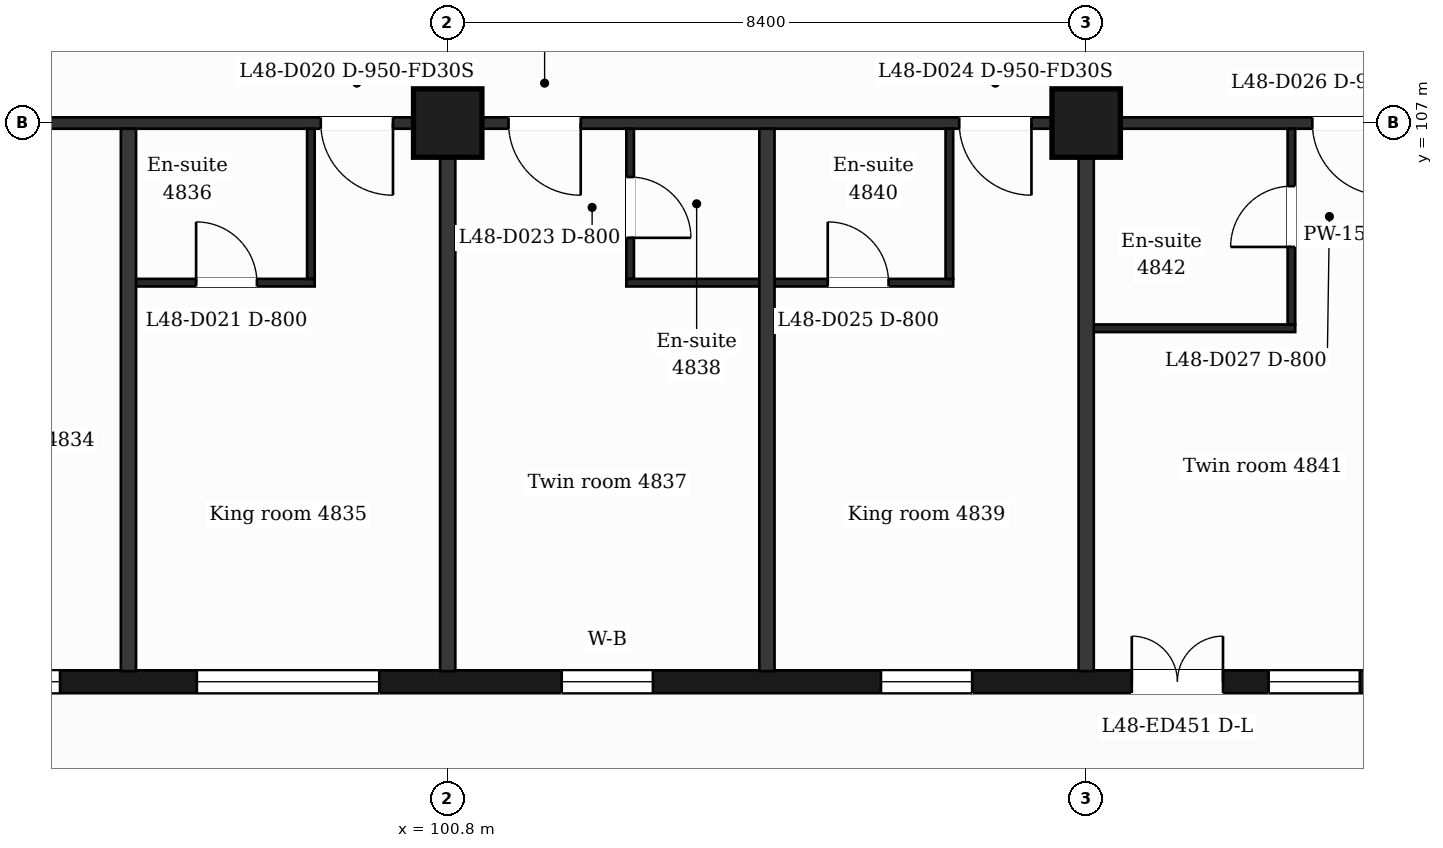
"""IFC4 building model, lengths in metres.
Left out: names, types, materials, properties, quantities, classifications, styles, units other than length and angle.
Written with IfcOpenShell. Run it as: python <this file> out.ifc"""

import sys

from ifc_helpers import new_model, si_unit, direction, frame, frame_2d, origin, origin_2d, place, context, subcontext, project, spatial, rectangle, extrude, element, fill, save


model = new_model("IFC4")
c1 = context("Model", 3, precision=1e-05, world=origin(), true_north=direction((0.0, 1.0)))
c2 = subcontext(c1, "Body", "Model", "MODEL_VIEW")
j1 = project(units=[si_unit("LENGTHUNIT", "METRE"), si_unit("PLANEANGLEUNIT", "RADIAN")], contexts=[c1])
p1 = place(None, origin())
s1 = spatial("IfcSite", under=j1, at=p1, CompositionType="ELEMENT")
p2 = place(p1, origin())
s2 = spatial("IfcBuilding", under=s1, at=p2, CompositionType="ELEMENT")
p3 = place(p2, frame((0.0, 0.0, 202.2)))
s3 = spatial("IfcBuildingStorey", under=s2, at=p3, CompositionType="ELEMENT", Elevation=202.2)
for number, where, z_axis, x_axis in (
    (1, (100.8, 107.0, 0.0), (0.0, 0.0, 1.0), (1.0, 0.0, 0.0)),
    (2, (109.2, 107.0, 0.0), (0.0, 0.0, 1.0), (1.0, 0.0, 0.0)),
):
    element("IfcColumn", number, at=place(p3, frame(where, z_axis=z_axis, x_axis=x_axis)), inside=s3, PredefinedType="COLUMN", context=c2, shape_type="SweptSolid", body=[
        extrude(rectangle(XDim=0.9, YDim=0.9, at=origin_2d()), origin(), (0.0, 0.0, 1.0), 3.7),
    ])
p4 = place(p3, frame((89.85, 99.65, 0.0), z_axis=(0.0, 0.0, 1.0), x_axis=(1.0, 0.0, 0.0)))
e3 = element("IfcWall", 3, at=p4, inside=s3, PredefinedType="SOLIDWALL", context=c2, shape_type="SweptSolid", body=[
    extrude(rectangle(XDim=47.25, YDim=0.3, at=frame_2d((23.625, 0.0))), origin(), (0.0, 0.0, 1.0), 3.38),
])
p5 = place(p4, frame((0.725, 0.0, 0.9)))
e4 = element("IfcOpeningElement", 4, at=p5, cuts=e3, PredefinedType="OPENING", context=c2, shape_type="SweptSolid", body=[
    extrude(rectangle(XDim=1.2, YDim=2.1, at=frame_2d((0.6, 1.05))), frame((0.0, 0.16, 0.0), z_axis=(0.0, -1.0, 0.0), x_axis=(1.0, 0.0, 0.0)), (0.0, 0.0, 1.0), 0.32),
])
p6 = place(p4, frame((3.45, 0.0, 0.9)))
e5 = element("IfcOpeningElement", 5, at=p6, cuts=e3, PredefinedType="OPENING", context=c2, shape_type="SweptSolid", body=[
    extrude(rectangle(XDim=2.4, YDim=2.1, at=frame_2d((1.2, 1.05))), frame((0.0, 0.16, 0.0), z_axis=(0.0, -1.0, 0.0), x_axis=(1.0, 0.0, 0.0)), (0.0, 0.0, 1.0), 0.32),
])
p7 = place(p4, frame((7.65, 0.0, 0.9)))
e6 = element("IfcOpeningElement", 6, at=p7, cuts=e3, PredefinedType="OPENING", context=c2, shape_type="SweptSolid", body=[
    extrude(rectangle(XDim=2.4, YDim=2.1, at=frame_2d((1.2, 1.05))), frame((0.0, 0.16, 0.0), z_axis=(0.0, -1.0, 0.0), x_axis=(1.0, 0.0, 0.0)), (0.0, 0.0, 1.0), 0.32),
])
p8 = place(p4, frame((12.45, 0.0, 0.9)))
e7 = element("IfcOpeningElement", 7, at=p8, cuts=e3, PredefinedType="OPENING", context=c2, shape_type="SweptSolid", body=[
    extrude(rectangle(XDim=1.2, YDim=2.1, at=frame_2d((0.6, 1.05))), frame((0.0, 0.16, 0.0), z_axis=(0.0, -1.0, 0.0), x_axis=(1.0, 0.0, 0.0)), (0.0, 0.0, 1.0), 0.32),
])
p9 = place(p4, frame((16.65, 0.0, 0.9)))
e8 = element("IfcOpeningElement", 8, at=p9, cuts=e3, PredefinedType="OPENING", context=c2, shape_type="SweptSolid", body=[
    extrude(rectangle(XDim=1.2, YDim=2.1, at=frame_2d((0.6, 1.05))), frame((0.0, 0.16, 0.0), z_axis=(0.0, -1.0, 0.0), x_axis=(1.0, 0.0, 0.0)), (0.0, 0.0, 1.0), 0.32),
])
p10 = place(p4, frame((19.95, 0.0, 0.0)))
e9 = element("IfcOpeningElement", 9, at=p10, cuts=e3, PredefinedType="OPENING", context=c2, shape_type="SweptSolid", body=[
    extrude(rectangle(XDim=1.2, YDim=2.4, at=frame_2d((0.6, 1.2))), frame((0.0, 0.16, 0.0), z_axis=(0.0, -1.0, 0.0), x_axis=(1.0, 0.0, 0.0)), (0.0, 0.0, 1.0), 0.32),
])
p11 = place(p4, frame((21.75, 0.0, 0.9)))
e10 = element("IfcOpeningElement", 10, at=p11, cuts=e3, PredefinedType="OPENING", context=c2, shape_type="SweptSolid", body=[
    extrude(rectangle(XDim=1.2, YDim=2.1, at=frame_2d((0.6, 1.05))), frame((0.0, 0.16, 0.0), z_axis=(0.0, -1.0, 0.0), x_axis=(1.0, 0.0, 0.0)), (0.0, 0.0, 1.0), 0.32),
])
p12 = place(p4, frame((24.45, 0.0, 0.9)))
e11 = element("IfcOpeningElement", 11, at=p12, cuts=e3, PredefinedType="OPENING", context=c2, shape_type="SweptSolid", body=[
    extrude(rectangle(XDim=2.4, YDim=2.1, at=frame_2d((1.2, 1.05))), frame((0.0, 0.16, 0.0), z_axis=(0.0, -1.0, 0.0), x_axis=(1.0, 0.0, 0.0)), (0.0, 0.0, 1.0), 0.32),
])
p13 = place(p4, frame((28.35, 0.0, 0.0)))
e12 = element("IfcOpeningElement", 12, at=p13, cuts=e3, PredefinedType="OPENING", context=c2, shape_type="SweptSolid", body=[
    extrude(rectangle(XDim=1.2, YDim=2.4, at=frame_2d((0.6, 1.2))), frame((0.0, 0.16, 0.0), z_axis=(0.0, -1.0, 0.0), x_axis=(1.0, 0.0, 0.0)), (0.0, 0.0, 1.0), 0.32),
])
p14 = place(p4, frame((30.15, 0.0, 0.9)))
e13 = element("IfcOpeningElement", 13, at=p14, cuts=e3, PredefinedType="OPENING", context=c2, shape_type="SweptSolid", body=[
    extrude(rectangle(XDim=1.2, YDim=2.1, at=frame_2d((0.6, 1.05))), frame((0.0, 0.16, 0.0), z_axis=(0.0, -1.0, 0.0), x_axis=(1.0, 0.0, 0.0)), (0.0, 0.0, 1.0), 0.32),
])
p15 = place(p4, frame((32.85, 0.0, 0.9)))
e14 = element("IfcOpeningElement", 14, at=p15, cuts=e3, PredefinedType="OPENING", context=c2, shape_type="SweptSolid", body=[
    extrude(rectangle(XDim=2.4, YDim=2.1, at=frame_2d((1.2, 1.05))), frame((0.0, 0.16, 0.0), z_axis=(0.0, -1.0, 0.0), x_axis=(1.0, 0.0, 0.0)), (0.0, 0.0, 1.0), 0.32),
])
p16 = place(p4, frame((37.05, 0.0, 0.9)))
e15 = element("IfcOpeningElement", 15, at=p16, cuts=e3, PredefinedType="OPENING", context=c2, shape_type="SweptSolid", body=[
    extrude(rectangle(XDim=2.4, YDim=2.1, at=frame_2d((1.2, 1.05))), frame((0.0, 0.16, 0.0), z_axis=(0.0, -1.0, 0.0), x_axis=(1.0, 0.0, 0.0)), (0.0, 0.0, 1.0), 0.32),
])
p17 = place(p4, frame((41.85, 0.0, 0.9)))
e16 = element("IfcOpeningElement", 16, at=p17, cuts=e3, PredefinedType="OPENING", context=c2, shape_type="SweptSolid", body=[
    extrude(rectangle(XDim=1.2, YDim=2.1, at=frame_2d((0.6, 1.05))), frame((0.0, 0.16, 0.0), z_axis=(0.0, -1.0, 0.0), x_axis=(1.0, 0.0, 0.0)), (0.0, 0.0, 1.0), 0.32),
])
p18 = place(p4, frame((45.25, 0.0, 0.9)))
e17 = element("IfcOpeningElement", 17, at=p18, cuts=e3, PredefinedType="OPENING", context=c2, shape_type="SweptSolid", body=[
    extrude(rectangle(XDim=1.2, YDim=2.1, at=frame_2d((0.6, 1.05))), frame((0.0, 0.16, 0.0), z_axis=(0.0, -1.0, 0.0), x_axis=(1.0, 0.0, 0.0)), (0.0, 0.0, 1.0), 0.32),
])
p19 = place(p3, frame((109.2, 104.3, 0.0), z_axis=(0.0, 0.0, 1.0), x_axis=(1.0, 0.0, 0.0)))
e18 = element("IfcWall", 18, at=p19, inside=s3, PredefinedType="PARTITIONING", context=c2, shape_type="SweptSolid", body=[
    extrude(rectangle(XDim=2.75, YDim=0.1, at=frame_2d((1.375, 0.0))), origin(), (0.0, 0.0, 1.0), 3.38),
])
p20 = place(p3, frame((96.6, 104.9, 0.0), z_axis=(0.0, 0.0, 1.0), x_axis=(1.0, 0.0, 0.0)))
e19 = element("IfcWall", 19, at=p20, inside=s3, PredefinedType="PARTITIONING", context=c2, shape_type="SweptSolid", body=[
    extrude(rectangle(XDim=2.45, YDim=0.1, at=frame_2d((1.225, 0.0))), origin(), (0.0, 0.0, 1.0), 3.38),
])
p21 = place(p20, frame((0.89, 0.0, 0.0)))
e20 = element("IfcOpeningElement", 20, at=p21, cuts=e19, PredefinedType="OPENING", context=c2, shape_type="SweptSolid", body=[
    extrude(rectangle(XDim=0.8, YDim=2.1, at=frame_2d((0.4, 1.05))), frame((0.0, 0.06, 0.0), z_axis=(0.0, -1.0, 0.0), x_axis=(1.0, 0.0, 0.0)), (0.0, 0.0, 1.0), 0.12),
])
p22 = place(p3, frame((103.15, 104.9, 0.0), z_axis=(0.0, 0.0, 1.0), x_axis=(1.0, 0.0, 0.0)))
e21 = element("IfcWall", 21, at=p22, inside=s3, PredefinedType="PARTITIONING", context=c2, shape_type="SweptSolid", body=[
    extrude(rectangle(XDim=4.3, YDim=0.1, at=frame_2d((2.15, 0.0))), origin(), (0.0, 0.0, 1.0), 3.38),
])
p23 = place(p22, frame((2.65, 0.0, 0.0)))
e22 = element("IfcOpeningElement", 22, at=p23, cuts=e21, PredefinedType="OPENING", context=c2, shape_type="SweptSolid", body=[
    extrude(rectangle(XDim=0.8, YDim=2.1, at=frame_2d((0.4, 1.05))), frame((0.0, 0.06, 0.0), z_axis=(0.0, -1.0, 0.0), x_axis=(1.0, 0.0, 0.0)), (0.0, 0.0, 1.0), 0.12),
])
p24 = place(p3, frame((87.018, 107.0, 0.0), z_axis=(0.0, 0.0, 1.0), x_axis=(1.0, 0.0, 0.0)))
e23 = element("IfcWall", 23, at=p24, inside=s3, PredefinedType="PARTITIONING", context=c2, shape_type="SweptSolid", body=[
    extrude(rectangle(XDim=52.765, YDim=0.15, at=frame_2d((26.382, 0.0))), origin(), (0.0, 0.0, 1.0), 3.38),
])
p25 = place(p24, frame((1.276, 0.0, 0.0)))
e24 = element("IfcOpeningElement", 24, at=p25, cuts=e23, PredefinedType="OPENING", context=c2, shape_type="SweptSolid", body=[
    extrude(rectangle(XDim=0.95, YDim=2.1, at=frame_2d((0.475, 1.05))), frame((0.0, 0.085, 0.0), z_axis=(0.0, -1.0, 0.0), x_axis=(1.0, 0.0, 0.0)), (0.0, 0.0, 1.0), 0.17),
])
p26 = place(p24, frame((6.369, 0.0, 0.0)))
e25 = element("IfcOpeningElement", 25, at=p26, cuts=e23, PredefinedType="OPENING", context=c2, shape_type="SweptSolid", body=[
    extrude(rectangle(XDim=0.95, YDim=2.1, at=frame_2d((0.475, 1.05))), frame((0.0, 0.085, 0.0), z_axis=(0.0, -1.0, 0.0), x_axis=(1.0, 0.0, 0.0)), (0.0, 0.0, 1.0), 0.17),
])
p27 = place(p24, frame((12.112, 0.0, 0.0)))
e26 = element("IfcOpeningElement", 26, at=p27, cuts=e23, PredefinedType="OPENING", context=c2, shape_type="SweptSolid", body=[
    extrude(rectangle(XDim=0.95, YDim=2.1, at=frame_2d((0.475, 1.05))), frame((0.0, 0.085, 0.0), z_axis=(0.0, -1.0, 0.0), x_axis=(1.0, 0.0, 0.0)), (0.0, 0.0, 1.0), 0.17),
])
p28 = place(p24, frame((14.582, 0.0, 0.0)))
e27 = element("IfcOpeningElement", 27, at=p28, cuts=e23, PredefinedType="OPENING", context=c2, shape_type="SweptSolid", body=[
    extrude(rectangle(XDim=0.95, YDim=2.1, at=frame_2d((0.475, 1.05))), frame((0.0, 0.085, 0.0), z_axis=(0.0, -1.0, 0.0), x_axis=(1.0, 0.0, 0.0)), (0.0, 0.0, 1.0), 0.17),
])
p29 = place(p24, frame((20.512, 0.0, 0.0)))
e28 = element("IfcOpeningElement", 28, at=p29, cuts=e23, PredefinedType="OPENING", context=c2, shape_type="SweptSolid", body=[
    extrude(rectangle(XDim=0.95, YDim=2.1, at=frame_2d((0.475, 1.05))), frame((0.0, 0.085, 0.0), z_axis=(0.0, -1.0, 0.0), x_axis=(1.0, 0.0, 0.0)), (0.0, 0.0, 1.0), 0.17),
])
p30 = place(p24, frame((25.157, 0.0, 0.0)))
e29 = element("IfcOpeningElement", 29, at=p30, cuts=e23, PredefinedType="OPENING", context=c2, shape_type="SweptSolid", body=[
    extrude(rectangle(XDim=0.95, YDim=2.1, at=frame_2d((0.475, 1.05))), frame((0.0, 0.085, 0.0), z_axis=(0.0, -1.0, 0.0), x_axis=(1.0, 0.0, 0.0)), (0.0, 0.0, 1.0), 0.17),
])
p31 = place(p24, frame((26.657, 0.0, 0.0)))
e30 = element("IfcOpeningElement", 30, at=p31, cuts=e23, PredefinedType="OPENING", context=c2, shape_type="SweptSolid", body=[
    extrude(rectangle(XDim=0.95, YDim=2.1, at=frame_2d((0.475, 1.05))), frame((0.0, 0.085, 0.0), z_axis=(0.0, -1.0, 0.0), x_axis=(1.0, 0.0, 0.0)), (0.0, 0.0, 1.0), 0.17),
])
p32 = place(p24, frame((31.302, 0.0, 0.0)))
e31 = element("IfcOpeningElement", 31, at=p32, cuts=e23, PredefinedType="OPENING", context=c2, shape_type="SweptSolid", body=[
    extrude(rectangle(XDim=0.95, YDim=2.1, at=frame_2d((0.475, 1.05))), frame((0.0, 0.085, 0.0), z_axis=(0.0, -1.0, 0.0), x_axis=(1.0, 0.0, 0.0)), (0.0, 0.0, 1.0), 0.17),
])
p33 = place(p24, frame((41.207, 0.0, 0.0)))
e32 = element("IfcOpeningElement", 32, at=p33, cuts=e23, PredefinedType="OPENING", context=c2, shape_type="SweptSolid", body=[
    extrude(rectangle(XDim=1.0, YDim=2.1, at=frame_2d((0.5, 1.05))), frame((0.0, 0.085, 0.0), z_axis=(0.0, -1.0, 0.0), x_axis=(1.0, 0.0, 0.0)), (0.0, 0.0, 1.0), 0.17),
])
p34 = place(p24, frame((43.907, 0.0, 0.0)))
e33 = element("IfcOpeningElement", 33, at=p34, cuts=e23, PredefinedType="OPENING", context=c2, shape_type="SweptSolid", body=[
    extrude(rectangle(XDim=0.95, YDim=2.1, at=frame_2d((0.475, 1.05))), frame((0.0, 0.085, 0.0), z_axis=(0.0, -1.0, 0.0), x_axis=(1.0, 0.0, 0.0)), (0.0, 0.0, 1.0), 0.17),
])
p35 = place(p24, frame((49.285, 0.0, 0.0)))
e34 = element("IfcOpeningElement", 34, at=p35, cuts=e23, PredefinedType="OPENING", context=c2, shape_type="SweptSolid", body=[
    extrude(rectangle(XDim=0.95, YDim=2.1, at=frame_2d((0.475, 1.05))), frame((0.0, 0.085, 0.0), z_axis=(0.0, -1.0, 0.0), x_axis=(1.0, 0.0, 0.0)), (0.0, 0.0, 1.0), 0.17),
])
p36 = place(p3, frame((96.6, 99.79, 0.0), z_axis=(0.0, 0.0, 1.0), x_axis=(0.0, 1.0, 0.0)))
e35 = element("IfcWall", 35, at=p36, inside=s3, PredefinedType="PARTITIONING", context=c2, shape_type="SweptSolid", body=[
    extrude(rectangle(XDim=7.135, YDim=0.2, at=frame_2d((3.567, 0.0))), origin(), (0.0, 0.0, 1.0), 3.38),
])
p37 = place(p3, frame((99.0, 104.95, 0.0), z_axis=(0.0, 0.0, 1.0), x_axis=(0.0, 1.0, 0.0)))
e36 = element("IfcWall", 36, at=p37, inside=s3, PredefinedType="PARTITIONING", context=c2, shape_type="SweptSolid", body=[
    extrude(rectangle(XDim=1.975, YDim=0.1, at=frame_2d((0.988, 0.0))), origin(), (0.0, 0.0, 1.0), 3.38),
])
p38 = place(p3, frame((100.8, 99.79, 0.0), z_axis=(0.0, 0.0, 1.0), x_axis=(0.0, 1.0, 0.0)))
e37 = element("IfcWall", 37, at=p38, inside=s3, PredefinedType="PARTITIONING", context=c2, shape_type="SweptSolid", body=[
    extrude(rectangle(XDim=7.135, YDim=0.2, at=frame_2d((3.567, 0.0))), origin(), (0.0, 0.0, 1.0), 3.38),
])
p39 = place(p3, frame((103.2, 104.95, 0.0), z_axis=(0.0, 0.0, 1.0), x_axis=(0.0, 1.0, 0.0)))
e38 = element("IfcWall", 38, at=p39, inside=s3, PredefinedType="PARTITIONING", context=c2, shape_type="SweptSolid", body=[
    extrude(rectangle(XDim=1.975, YDim=0.1, at=frame_2d((0.988, 0.0))), origin(), (0.0, 0.0, 1.0), 3.38),
])
p40 = place(p39, frame((0.54, 0.0, 0.0)))
e39 = element("IfcOpeningElement", 39, at=p40, cuts=e38, PredefinedType="OPENING", context=c2, shape_type="SweptSolid", body=[
    extrude(rectangle(XDim=0.8, YDim=2.1, at=frame_2d((0.4, 1.05))), frame((0.0, 0.06, 0.0), z_axis=(0.0, -1.0, 0.0), x_axis=(1.0, 0.0, 0.0)), (0.0, 0.0, 1.0), 0.12),
])
p41 = place(p3, frame((105.0, 99.79, 0.0), z_axis=(0.0, 0.0, 1.0), x_axis=(0.0, 1.0, 0.0)))
e40 = element("IfcWall", 40, at=p41, inside=s3, PredefinedType="PARTITIONING", context=c2, shape_type="SweptSolid", body=[
    extrude(rectangle(XDim=7.135, YDim=0.2, at=frame_2d((3.567, 0.0))), origin(), (0.0, 0.0, 1.0), 3.38),
])
p42 = place(p3, frame((107.4, 104.95, 0.0), z_axis=(0.0, 0.0, 1.0), x_axis=(0.0, 1.0, 0.0)))
e41 = element("IfcWall", 41, at=p42, inside=s3, PredefinedType="PARTITIONING", context=c2, shape_type="SweptSolid", body=[
    extrude(rectangle(XDim=1.975, YDim=0.1, at=frame_2d((0.988, 0.0))), origin(), (0.0, 0.0, 1.0), 3.38),
])
p43 = place(p3, frame((109.2, 99.79, 0.0), z_axis=(0.0, 0.0, 1.0), x_axis=(0.0, 1.0, 0.0)))
e42 = element("IfcWall", 42, at=p43, inside=s3, PredefinedType="PARTITIONING", context=c2, shape_type="SweptSolid", body=[
    extrude(rectangle(XDim=7.135, YDim=0.2, at=frame_2d((3.567, 0.0))), origin(), (0.0, 0.0, 1.0), 3.38),
])
p44 = place(p3, frame((111.9, 104.35, 0.0), z_axis=(0.0, 0.0, 1.0), x_axis=(0.0, 1.0, 0.0)))
e43 = element("IfcWall", 43, at=p44, inside=s3, PredefinedType="PARTITIONING", context=c2, shape_type="SweptSolid", body=[
    extrude(rectangle(XDim=2.575, YDim=0.1, at=frame_2d((1.288, 0.0))), origin(), (0.0, 0.0, 1.0), 3.38),
])
p45 = place(p44, frame((1.02, 0.0, 0.0)))
e44 = element("IfcOpeningElement", 44, at=p45, cuts=e43, PredefinedType="OPENING", context=c2, shape_type="SweptSolid", body=[
    extrude(rectangle(XDim=0.8, YDim=2.1, at=frame_2d((0.4, 1.05))), frame((0.0, 0.06, 0.0), z_axis=(0.0, -1.0, 0.0), x_axis=(1.0, 0.0, 0.0)), (0.0, 0.0, 1.0), 0.12),
])
p46 = place(p6, origin())
e45 = element("IfcWindow", 45, at=p46, inside=s3, PartitioningType="SINGLE_PANEL", PredefinedType="WINDOW", context=c2, shape_type="SweptSolid", body=[
    extrude(rectangle(XDim=2.4, YDim=2.1, at=frame_2d((1.2, 1.05))), frame((0.0, 0.03, 0.0), z_axis=(0.0, -1.0, 0.0), x_axis=(1.0, 0.0, 0.0)), (0.0, 0.0, 1.0), 0.06),
])
fill(e5, e45)
p47 = place(p7, origin())
e46 = element("IfcWindow", 46, at=p47, inside=s3, PartitioningType="SINGLE_PANEL", PredefinedType="WINDOW", context=c2, shape_type="SweptSolid", body=[
    extrude(rectangle(XDim=2.4, YDim=2.1, at=frame_2d((1.2, 1.05))), frame((0.0, 0.03, 0.0), z_axis=(0.0, -1.0, 0.0), x_axis=(1.0, 0.0, 0.0)), (0.0, 0.0, 1.0), 0.06),
])
fill(e6, e46)
p48 = place(p8, origin())
e47 = element("IfcWindow", 47, at=p48, inside=s3, PartitioningType="SINGLE_PANEL", PredefinedType="WINDOW", context=c2, shape_type="SweptSolid", body=[
    extrude(rectangle(XDim=1.2, YDim=2.1, at=frame_2d((0.6, 1.05))), frame((0.0, 0.03, 0.0), z_axis=(0.0, -1.0, 0.0), x_axis=(1.0, 0.0, 0.0)), (0.0, 0.0, 1.0), 0.06),
])
fill(e7, e47)
p49 = place(p9, origin())
e48 = element("IfcWindow", 48, at=p49, inside=s3, PartitioningType="SINGLE_PANEL", PredefinedType="WINDOW", context=c2, shape_type="SweptSolid", body=[
    extrude(rectangle(XDim=1.2, YDim=2.1, at=frame_2d((0.6, 1.05))), frame((0.0, 0.03, 0.0), z_axis=(0.0, -1.0, 0.0), x_axis=(1.0, 0.0, 0.0)), (0.0, 0.0, 1.0), 0.06),
])
fill(e8, e48)
p50 = place(p10, origin())
e49 = element("IfcDoor", 49, at=p50, inside=s3, OperationType="DOUBLE_DOOR_SINGLE_SWING", PredefinedType="DOOR", context=c2, shape_type="SweptSolid", body=[
    extrude(rectangle(XDim=1.2, YDim=2.4, at=frame_2d((0.6, 1.2))), frame((0.0, 0.025, 0.0), z_axis=(0.0, -1.0, 0.0), x_axis=(1.0, 0.0, 0.0)), (0.0, 0.0, 1.0), 0.05),
])
fill(e9, e49)
p51 = place(p11, origin())
e50 = element("IfcWindow", 50, at=p51, inside=s3, PartitioningType="SINGLE_PANEL", PredefinedType="WINDOW", context=c2, shape_type="SweptSolid", body=[
    extrude(rectangle(XDim=1.2, YDim=2.1, at=frame_2d((0.6, 1.05))), frame((0.0, 0.03, 0.0), z_axis=(0.0, -1.0, 0.0), x_axis=(1.0, 0.0, 0.0)), (0.0, 0.0, 1.0), 0.06),
])
fill(e10, e50)
p52 = place(p27, origin())
e51 = element("IfcDoor", 51, at=p52, inside=s3, OperationType="SINGLE_SWING_RIGHT", PredefinedType="DOOR", context=c2, shape_type="SweptSolid", body=[
    extrude(rectangle(XDim=0.95, YDim=2.1, at=frame_2d((0.475, 1.05))), frame((0.0, 0.025, 0.0), z_axis=(0.0, -1.0, 0.0), x_axis=(1.0, 0.0, 0.0)), (0.0, 0.0, 1.0), 0.05),
])
fill(e26, e51)
p53 = place(p21, origin())
e52 = element("IfcDoor", 52, at=p53, inside=s3, OperationType="SINGLE_SWING_LEFT", PredefinedType="DOOR", context=c2, shape_type="SweptSolid", body=[
    extrude(rectangle(XDim=0.8, YDim=2.1, at=frame_2d((0.4, 1.05))), frame((0.0, 0.025, 0.0), z_axis=(0.0, -1.0, 0.0), x_axis=(1.0, 0.0, 0.0)), (0.0, 0.0, 1.0), 0.05),
])
fill(e20, e52)
p54 = place(p28, origin())
e53 = element("IfcDoor", 53, at=p54, inside=s3, OperationType="SINGLE_SWING_RIGHT", PredefinedType="DOOR", context=c2, shape_type="SweptSolid", body=[
    extrude(rectangle(XDim=0.95, YDim=2.1, at=frame_2d((0.475, 1.05))), frame((0.0, 0.025, 0.0), z_axis=(0.0, -1.0, 0.0), x_axis=(1.0, 0.0, 0.0)), (0.0, 0.0, 1.0), 0.05),
])
fill(e27, e53)
p55 = place(p40, origin())
e54 = element("IfcDoor", 54, at=p55, inside=s3, OperationType="SINGLE_SWING_LEFT", PredefinedType="DOOR", context=c2, shape_type="SweptSolid", body=[
    extrude(rectangle(XDim=0.8, YDim=2.1, at=frame_2d((0.4, 1.05))), frame((0.0, 0.025, 0.0), z_axis=(0.0, -1.0, 0.0), x_axis=(1.0, 0.0, 0.0)), (0.0, 0.0, 1.0), 0.05),
])
fill(e39, e54)
p56 = place(p29, origin())
e55 = element("IfcDoor", 55, at=p56, inside=s3, OperationType="SINGLE_SWING_RIGHT", PredefinedType="DOOR", context=c2, shape_type="SweptSolid", body=[
    extrude(rectangle(XDim=0.95, YDim=2.1, at=frame_2d((0.475, 1.05))), frame((0.0, 0.025, 0.0), z_axis=(0.0, -1.0, 0.0), x_axis=(1.0, 0.0, 0.0)), (0.0, 0.0, 1.0), 0.05),
])
fill(e28, e55)
p57 = place(p23, origin())
e56 = element("IfcDoor", 56, at=p57, inside=s3, OperationType="SINGLE_SWING_LEFT", PredefinedType="DOOR", context=c2, shape_type="SweptSolid", body=[
    extrude(rectangle(XDim=0.8, YDim=2.1, at=frame_2d((0.4, 1.05))), frame((0.0, 0.025, 0.0), z_axis=(0.0, -1.0, 0.0), x_axis=(1.0, 0.0, 0.0)), (0.0, 0.0, 1.0), 0.05),
])
fill(e22, e56)
p58 = place(p30, origin())
e57 = element("IfcDoor", 57, at=p58, inside=s3, OperationType="SINGLE_SWING_RIGHT", PredefinedType="DOOR", context=c2, shape_type="SweptSolid", body=[
    extrude(rectangle(XDim=0.95, YDim=2.1, at=frame_2d((0.475, 1.05))), frame((0.0, 0.025, 0.0), z_axis=(0.0, -1.0, 0.0), x_axis=(1.0, 0.0, 0.0)), (0.0, 0.0, 1.0), 0.05),
])
fill(e29, e57)
p59 = place(p45, origin())
e58 = element("IfcDoor", 58, at=p59, inside=s3, OperationType="SINGLE_SWING_LEFT", PredefinedType="DOOR", context=c2, shape_type="SweptSolid", body=[
    extrude(rectangle(XDim=0.8, YDim=2.1, at=frame_2d((0.4, 1.05))), frame((0.0, 0.025, 0.0), z_axis=(0.0, -1.0, 0.0), x_axis=(1.0, 0.0, 0.0)), (0.0, 0.0, 1.0), 0.05),
])
fill(e44, e58)
save(model, sys.argv[1])
